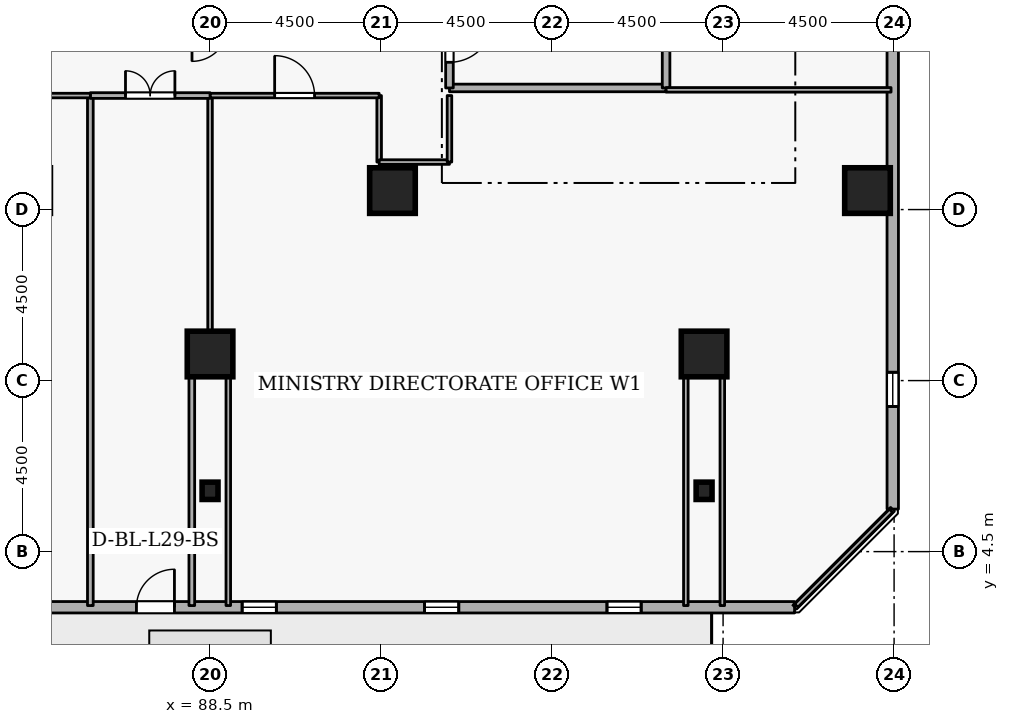
"""IFC4 building model, lengths in metres.
Left out: names, types, materials, properties, quantities, classifications, styles, units other than length and angle.
Written with IfcOpenShell. Run it as: python <this file> out.ifc"""

import sys

from ifc_helpers import new_model, si_unit, direction, frame, frame_2d, origin, origin_2d, place, context, subcontext, project, spatial, rectangle, i_section, extrude, element, fill, save


model = new_model("IFC4")
c1 = context("Model", 3, precision=1e-05, world=origin(), true_north=direction((0.0, 1.0)))
c2 = subcontext(c1, "Body", "Model", "MODEL_VIEW")
j1 = project(units=[si_unit("LENGTHUNIT", "METRE"), si_unit("PLANEANGLEUNIT", "RADIAN")], contexts=[c1])
p1 = place(None, origin())
s1 = spatial("IfcSite", under=j1, at=p1, CompositionType="ELEMENT")
p2 = place(p1, origin())
s2 = spatial("IfcBuilding", under=s1, at=p2, CompositionType="ELEMENT")
p3 = place(p2, frame((0.0, 0.0, 112.5)))
s3 = spatial("IfcBuildingStorey", under=s2, at=p3, CompositionType="ELEMENT", Elevation=112.5)
for number, where, z_axis, x_axis in (
    (1, (105.8, 14.0, 0.0), (0.0, 0.0, 1.0), (1.0, 0.0, 0.0)),
    (2, (101.5, 9.7, 0.0), (0.0, 0.0, 1.0), (1.0, 0.0, 0.0)),
    (3, (88.5, 9.7, 0.0), (0.0, 0.0, 1.0), (1.0, 0.0, 0.0)),
    (4, (93.3, 14.0, 0.0), (0.0, 0.0, 1.0), (1.0, 0.0, 0.0)),
):
    element("IfcColumn", number, at=place(p3, frame(where, z_axis=z_axis, x_axis=x_axis)), inside=s3, PredefinedType="COLUMN", context=c2, shape_type="SweptSolid", body=[
        extrude(rectangle(XDim=1.2, YDim=1.2, at=origin_2d()), origin(), (0.0, 0.0, 1.0), 3.6),
    ])
for number, where, z_axis, x_axis in (
    (5, (101.5, 6.1, 0.0), (0.0, 0.0, 1.0), (1.0, 0.0, 0.0)),
    (6, (88.5, 6.1, 0.0), (0.0, 0.0, 1.0), (1.0, 0.0, 0.0)),
):
    element("IfcColumn", number, at=place(p3, frame(where, z_axis=z_axis, x_axis=x_axis)), inside=s3, PredefinedType="COLUMN", context=c2, shape_type="SweptSolid", body=[
        extrude(i_section(OverallWidth=0.418, OverallDepth=0.456, WebThickness=0.042, FlangeThickness=0.067, FilletRadius=0.015, at=origin_2d()), origin(), (0.0, 0.0, 1.0), 3.6),
    ])
p4 = place(p3, frame((67.445, 3.036, 0.0), z_axis=(0.0, 0.0, 1.0), x_axis=(0.999999999641, -2.6801568e-05, 0.0)))
e7 = element("IfcWall", 7, at=p4, inside=s3, PredefinedType="STANDARD", context=c2, shape_type="SweptSolid", body=[
    extrude(rectangle(XDim=36.437, YDim=0.3, at=frame_2d((18.218, 0.0))), origin(), (0.0, 0.0, 1.0), 2.7),
])
p5 = place(p4, frame((19.118, 0.0, 0.0)))
e8 = element("IfcOpeningElement", 8, at=p5, cuts=e7, PredefinedType="OPENING", context=c2, shape_type="SweptSolid", body=[
    extrude(rectangle(XDim=1.0, YDim=2.08, at=frame_2d((0.5, 1.04))), frame((0.0, 0.16, 0.0), z_axis=(0.0, -1.0, 0.0), x_axis=(1.0, 0.0, 0.0)), (0.0, 0.0, 1.0), 0.32),
])
p6 = place(p4, frame((2.7, 0.0, 0.72)))
e9 = element("IfcOpeningElement", 9, at=p6, cuts=e7, PredefinedType="OPENING", context=c2, shape_type="SweptSolid", body=[
    extrude(rectangle(XDim=0.9, YDim=1.75, at=frame_2d((0.45, 0.875))), frame((0.0, 0.16, 0.0), z_axis=(0.0, -1.0, 0.0), x_axis=(1.0, 0.0, 0.0)), (0.0, 0.0, 1.0), 0.32),
])
p7 = place(p4, frame((12.3, 0.0, 0.72)))
e10 = element("IfcOpeningElement", 10, at=p7, cuts=e7, PredefinedType="OPENING", context=c2, shape_type="SweptSolid", body=[
    extrude(rectangle(XDim=0.9, YDim=1.75, at=frame_2d((0.45, 0.875))), frame((0.0, 0.16, 0.0), z_axis=(0.0, -1.0, 0.0), x_axis=(1.0, 0.0, 0.0)), (0.0, 0.0, 1.0), 0.32),
])
p8 = place(p4, frame((21.9, 0.0, 0.72)))
e11 = element("IfcOpeningElement", 11, at=p8, cuts=e7, PredefinedType="OPENING", context=c2, shape_type="SweptSolid", body=[
    extrude(rectangle(XDim=0.9, YDim=1.75, at=frame_2d((0.45, 0.875))), frame((0.0, 0.16, 0.0), z_axis=(0.0, -1.0, 0.0), x_axis=(1.0, 0.0, 0.0)), (0.0, 0.0, 1.0), 0.32),
])
p9 = place(p4, frame((26.7, 0.0, 0.72)))
e12 = element("IfcOpeningElement", 12, at=p9, cuts=e7, PredefinedType="OPENING", context=c2, shape_type="SweptSolid", body=[
    extrude(rectangle(XDim=0.9, YDim=1.75, at=frame_2d((0.45, 0.875))), frame((0.0, 0.16, 0.0), z_axis=(0.0, -1.0, 0.0), x_axis=(1.0, 0.0, 0.0)), (0.0, 0.0, 1.0), 0.32),
])
p10 = place(p4, frame((31.5, 0.0, 0.72)))
e13 = element("IfcOpeningElement", 13, at=p10, cuts=e7, PredefinedType="OPENING", context=c2, shape_type="SweptSolid", body=[
    extrude(rectangle(XDim=0.9, YDim=1.75, at=frame_2d((0.45, 0.875))), frame((0.0, 0.16, 0.0), z_axis=(0.0, -1.0, 0.0), x_axis=(1.0, 0.0, 0.0)), (0.0, 0.0, 1.0), 0.32),
])
p11 = place(p3, frame((106.465, 5.619, 0.0), z_axis=(0.0, 0.0, 1.0), x_axis=(-2.6801568e-05, 0.999999999641, 0.0)))
e14 = element("IfcWall", 14, at=p11, inside=s3, PredefinedType="STANDARD", context=c2, shape_type="SweptSolid", body=[
    extrude(rectangle(XDim=36.437, YDim=0.3, at=frame_2d((18.218, 0.0))), origin(), (0.0, 0.0, 1.0), 2.7),
])
p12 = place(p11, frame((2.7, 0.0, 0.72)))
e15 = element("IfcOpeningElement", 15, at=p12, cuts=e14, PredefinedType="OPENING", context=c2, shape_type="SweptSolid", body=[
    extrude(rectangle(XDim=0.9, YDim=1.75, at=frame_2d((0.45, 0.875))), frame((0.0, 0.16, 0.0), z_axis=(0.0, -1.0, 0.0), x_axis=(1.0, 0.0, 0.0)), (0.0, 0.0, 1.0), 0.32),
])
p13 = place(p11, frame((12.3, 0.0, 0.72)))
e16 = element("IfcOpeningElement", 16, at=p13, cuts=e14, PredefinedType="OPENING", context=c2, shape_type="SweptSolid", body=[
    extrude(rectangle(XDim=0.9, YDim=1.75, at=frame_2d((0.45, 0.875))), frame((0.0, 0.16, 0.0), z_axis=(0.0, -1.0, 0.0), x_axis=(1.0, 0.0, 0.0)), (0.0, 0.0, 1.0), 0.32),
])
p14 = place(p11, frame((17.1, 0.0, 0.72)))
e17 = element("IfcOpeningElement", 17, at=p14, cuts=e14, PredefinedType="OPENING", context=c2, shape_type="SweptSolid", body=[
    extrude(rectangle(XDim=0.9, YDim=1.75, at=frame_2d((0.45, 0.875))), frame((0.0, 0.16, 0.0), z_axis=(0.0, -1.0, 0.0), x_axis=(1.0, 0.0, 0.0)), (0.0, 0.0, 1.0), 0.32),
])
p15 = place(p11, frame((26.7, 0.0, 0.72)))
e18 = element("IfcOpeningElement", 18, at=p15, cuts=e14, PredefinedType="OPENING", context=c2, shape_type="SweptSolid", body=[
    extrude(rectangle(XDim=0.9, YDim=1.75, at=frame_2d((0.45, 0.875))), frame((0.0, 0.16, 0.0), z_axis=(0.0, -1.0, 0.0), x_axis=(1.0, 0.0, 0.0)), (0.0, 0.0, 1.0), 0.32),
])
p16 = place(p11, frame((31.5, 0.0, 0.72)))
e19 = element("IfcOpeningElement", 19, at=p16, cuts=e14, PredefinedType="OPENING", context=c2, shape_type="SweptSolid", body=[
    extrude(rectangle(XDim=0.9, YDim=1.75, at=frame_2d((0.45, 0.875))), frame((0.0, 0.16, 0.0), z_axis=(0.0, -1.0, 0.0), x_axis=(1.0, 0.0, 0.0)), (0.0, 0.0, 1.0), 0.32),
])
p17 = place(p3, frame((94.8, 16.7, 0.0), z_axis=(0.0, 0.0, 1.0), x_axis=(1.0, 0.0, 0.0)))
e20 = element("IfcWall", 20, at=p17, inside=s3, PredefinedType="STANDARD", context=c2, shape_type="SweptSolid", body=[
    extrude(rectangle(XDim=5.7, YDim=0.2, at=frame_2d((2.85, 0.0))), origin(), (0.0, 0.0, 1.0), 3.34),
])
p18 = place(p3, frame((100.5, 16.7, 0.0), z_axis=(0.0, 0.0, 1.0), x_axis=(0.0, 1.0, 0.0)))
e21 = element("IfcWall", 21, at=p18, inside=s3, PredefinedType="STANDARD", context=c2, shape_type="SweptSolid", body=[
    extrude(rectangle(XDim=2.5, YDim=0.2, at=frame_2d((1.25, 0.0))), origin(), (0.0, 0.0, 1.0), 3.34),
])
p19 = place(p3, frame((94.8, 19.2, 0.0), z_axis=(0.0, 0.0, 1.0), x_axis=(0.0, -1.0, 0.0)))
e22 = element("IfcWall", 22, at=p19, inside=s3, PredefinedType="STANDARD", context=c2, shape_type="SweptSolid", body=[
    extrude(rectangle(XDim=2.5, YDim=0.2, at=frame_2d((1.25, 0.0))), origin(), (0.0, 0.0, 1.0), 3.34),
])
p20 = place(p19, frame((0.675, 0.0, 0.0)))
e23 = element("IfcOpeningElement", 23, at=p20, cuts=e22, PredefinedType="OPENING", context=c2, shape_type="SweptSolid", body=[
    extrude(rectangle(XDim=1.15, YDim=2.1, at=frame_2d((0.575, 1.05))), frame((0.0, 0.11, 0.0), z_axis=(0.0, -1.0, 0.0), x_axis=(1.0, 0.0, 0.0)), (0.0, 0.0, 1.0), 0.22),
])
p21 = place(p3, frame((92.95, 16.5, 0.0), z_axis=(0.0, 0.0, 1.0), x_axis=(0.0, -1.0, 0.0)))
e24 = element("IfcWall", 24, at=p21, inside=s3, PredefinedType="PARTITIONING", context=c2, shape_type="SweptSolid", body=[
    extrude(rectangle(XDim=1.75, YDim=0.12, at=frame_2d((0.875, 0.0))), origin(), (0.0, 0.0, 1.0), 3.34),
])
p22 = place(p3, frame((92.95, 14.75, 0.0), z_axis=(0.0, 0.0, 1.0), x_axis=(1.0, 0.0, 0.0)))
e25 = element("IfcWall", 25, at=p22, inside=s3, PredefinedType="PARTITIONING", context=c2, shape_type="SweptSolid", body=[
    extrude(rectangle(XDim=1.85, YDim=0.12, at=frame_2d((0.925, 0.0))), origin(), (0.0, 0.0, 1.0), 3.34),
])
p23 = place(p3, frame((94.8, 14.75, 0.0), z_axis=(0.0, 0.0, 1.0), x_axis=(0.0, 1.0, 0.0)))
e26 = element("IfcWall", 26, at=p23, inside=s3, PredefinedType="PARTITIONING", context=c2, shape_type="SweptSolid", body=[
    extrude(rectangle(XDim=1.75, YDim=0.12, at=frame_2d((0.875, 0.0))), origin(), (0.0, 0.0, 1.0), 3.34),
])
p24 = place(p3, frame((100.5, 16.65, 0.0), z_axis=(0.0, 0.0, 1.0), x_axis=(1.0, 0.0, 0.0)))
e27 = element("IfcWall", 27, at=p24, inside=s3, PredefinedType="PARTITIONING", context=c2, shape_type="SweptSolid", body=[
    extrude(rectangle(XDim=5.92, YDim=0.12, at=frame_2d((2.96, 0.0))), origin(), (0.0, 0.0, 1.0), 3.34),
])
p25 = place(p3, frame((106.42, 5.575, 0.0), z_axis=(0.0, 0.0, 1.0), x_axis=(-0.707106781187, -0.707106781187, 0.0)))
e28 = element("IfcWall", 28, at=p25, inside=s3, PredefinedType="PARTITIONING", context=c2, shape_type="SweptSolid", body=[
    extrude(rectangle(XDim=3.528, YDim=0.12, at=frame_2d((1.764, 0.0))), origin(), (0.0, 0.0, 1.0), 3.34),
])
for number, where, z_axis, x_axis in (
    (29, (101.98, 3.08, 0.0), (0.0, 0.0, 1.0), (0.0, 1.0, 0.0)),
    (30, (101.02, 9.7, 0.0), (0.0, 0.0, 1.0), (0.0, -1.0, 0.0)),
    (31, (88.98, 3.08, 0.0), (0.0, 0.0, 1.0), (0.0, 1.0, 0.0)),
):
    element("IfcWall", number, at=place(p3, frame(where, z_axis=z_axis, x_axis=x_axis)), inside=s3, PredefinedType="PARTITIONING", context=c2, shape_type="SweptSolid", body=[
        extrude(rectangle(XDim=6.62, YDim=0.12, at=frame_2d((3.31, 0.0))), origin(), (0.0, 0.0, 1.0), 3.34),
    ])
p26 = place(p3, frame((88.5, 9.7, 0.0), z_axis=(0.0, 0.0, 1.0), x_axis=(0.0, 1.0, 0.0)))
e32 = element("IfcWall", 32, at=p26, inside=s3, PredefinedType="PARTITIONING", context=c2, shape_type="SweptSolid", body=[
    extrude(rectangle(XDim=6.8, YDim=0.12, at=frame_2d((3.4, 0.0))), origin(), (0.0, 0.0, 1.0), 2.882),
])
p27 = place(p3, frame((88.5, 16.5, 0.0), z_axis=(0.0, 0.0, 1.0), x_axis=(1.0, 0.0, 0.0)))
e33 = element("IfcWall", 33, at=p27, inside=s3, PredefinedType="PARTITIONING", context=c2, shape_type="SweptSolid", body=[
    extrude(rectangle(XDim=4.45, YDim=0.12, at=frame_2d((2.225, 0.0))), origin(), (0.0, 0.0, 1.0), 3.34),
])
p28 = place(p27, frame((1.7, 0.0, 0.0)))
e34 = element("IfcOpeningElement", 34, at=p28, cuts=e33, PredefinedType="OPENING", context=c2, shape_type="SweptSolid", body=[
    extrude(rectangle(XDim=1.05, YDim=2.1, at=frame_2d((0.525, 1.05))), frame((0.0, 0.07, 0.0), z_axis=(0.0, -1.0, 0.0), x_axis=(1.0, 0.0, 0.0)), (0.0, 0.0, 1.0), 0.14),
])
p29 = place(p3, frame((88.02, 9.7, 0.0), z_axis=(0.0, 0.0, 1.0), x_axis=(0.0, -1.0, 0.0)))
e35 = element("IfcWall", 35, at=p29, inside=s3, PredefinedType="PARTITIONING", context=c2, shape_type="SweptSolid", body=[
    extrude(rectangle(XDim=6.62, YDim=0.15, at=frame_2d((3.31, 0.0))), origin(), (0.0, 0.0, 1.0), 3.34),
])
p30 = place(p3, frame((85.35, 3.08, 0.0), z_axis=(0.0, 0.0, 1.0), x_axis=(0.0, 1.0, 0.0)))
e36 = element("IfcWall", 36, at=p30, inside=s3, PredefinedType="PARTITIONING", context=c2, shape_type="SweptSolid", body=[
    extrude(rectangle(XDim=13.42, YDim=0.15, at=frame_2d((6.71, 0.0))), origin(), (0.0, 0.0, 1.0), 3.34),
])
p31 = place(p3, frame((85.35, 16.5, 0.0), z_axis=(0.0, 0.0, 1.0), x_axis=(1.0, 0.0, 0.0)))
e37 = element("IfcWall", 37, at=p31, inside=s3, PredefinedType="PARTITIONING", context=c2, shape_type="SweptSolid", body=[
    extrude(rectangle(XDim=3.15, YDim=0.15, at=frame_2d((1.575, 0.0))), origin(), (0.0, 0.0, 1.0), 3.34),
])
p32 = place(p31, frame((0.925, 0.0, 0.0)))
e38 = element("IfcOpeningElement", 38, at=p32, cuts=e37, PredefinedType="OPENING", context=c2, shape_type="SweptSolid", body=[
    extrude(rectangle(XDim=1.3, YDim=2.12, at=frame_2d((0.65, 1.06))), frame((0.0, 0.085, 0.0), z_axis=(0.0, -1.0, 0.0), x_axis=(1.0, 0.0, 0.0)), (0.0, 0.0, 1.0), 0.17),
])
p33 = place(p3, frame((84.05, 16.5, 0.0), z_axis=(0.0, 0.0, 1.0), x_axis=(1.0, 0.0, 0.0)))
e39 = element("IfcWall", 39, at=p33, inside=s3, PredefinedType="PARTITIONING", context=c2, shape_type="SweptSolid", body=[
    extrude(rectangle(XDim=1.3, YDim=0.12, at=frame_2d((0.65, 0.0))), origin(), (0.0, 0.0, 1.0), 3.34),
])
p34 = place(p5, origin())
e40 = element("IfcDoor", 40, at=p34, inside=s3, OperationType="SINGLE_SWING_RIGHT", PredefinedType="DOOR", context=c2, shape_type="SweptSolid", body=[
    extrude(rectangle(XDim=1.0, YDim=2.08, at=frame_2d((0.5, 1.04))), frame((0.0, 0.025, 0.0), z_axis=(0.0, -1.0, 0.0), x_axis=(1.0, 0.0, 0.0)), (0.0, 0.0, 1.0), 0.05),
])
fill(e8, e40)
p35 = place(p8, origin())
e41 = element("IfcWindow", 41, at=p35, inside=s3, PartitioningType="SINGLE_PANEL", PredefinedType="WINDOW", context=c2, shape_type="SweptSolid", body=[
    extrude(rectangle(XDim=0.9, YDim=1.75, at=frame_2d((0.45, 0.875))), frame((0.0, 0.03, 0.0), z_axis=(0.0, -1.0, 0.0), x_axis=(1.0, 0.0, 0.0)), (0.0, 0.0, 1.0), 0.06),
])
fill(e11, e41)
p36 = place(p9, origin())
e42 = element("IfcWindow", 42, at=p36, inside=s3, PartitioningType="SINGLE_PANEL", PredefinedType="WINDOW", context=c2, shape_type="SweptSolid", body=[
    extrude(rectangle(XDim=0.9, YDim=1.75, at=frame_2d((0.45, 0.875))), frame((0.0, 0.03, 0.0), z_axis=(0.0, -1.0, 0.0), x_axis=(1.0, 0.0, 0.0)), (0.0, 0.0, 1.0), 0.06),
])
fill(e12, e42)
p37 = place(p10, origin())
e43 = element("IfcWindow", 43, at=p37, inside=s3, PartitioningType="SINGLE_PANEL", PredefinedType="WINDOW", context=c2, shape_type="SweptSolid", body=[
    extrude(rectangle(XDim=0.9, YDim=1.75, at=frame_2d((0.45, 0.875))), frame((0.0, 0.03, 0.0), z_axis=(0.0, -1.0, 0.0), x_axis=(1.0, 0.0, 0.0)), (0.0, 0.0, 1.0), 0.06),
])
fill(e13, e43)
p38 = place(p12, origin())
e44 = element("IfcWindow", 44, at=p38, inside=s3, PartitioningType="SINGLE_PANEL", PredefinedType="WINDOW", context=c2, shape_type="SweptSolid", body=[
    extrude(rectangle(XDim=0.9, YDim=1.75, at=frame_2d((0.45, 0.875))), frame((0.0, 0.03, 0.0), z_axis=(0.0, -1.0, 0.0), x_axis=(1.0, 0.0, 0.0)), (0.0, 0.0, 1.0), 0.06),
])
fill(e15, e44)
p39 = place(p20, origin())
e45 = element("IfcDoor", 45, at=p39, inside=s3, OperationType="SINGLE_SWING_LEFT", PredefinedType="DOOR", context=c2, shape_type="SweptSolid", body=[
    extrude(rectangle(XDim=1.15, YDim=2.1, at=frame_2d((0.575, 1.05))), frame((0.0, 0.025, 0.0), z_axis=(0.0, -1.0, 0.0), x_axis=(1.0, 0.0, 0.0)), (0.0, 0.0, 1.0), 0.05),
])
fill(e23, e45)
p40 = place(p28, origin())
e46 = element("IfcDoor", 46, at=p40, inside=s3, OperationType="SINGLE_SWING_LEFT", PredefinedType="DOOR", context=c2, shape_type="SweptSolid", body=[
    extrude(rectangle(XDim=1.05, YDim=2.1, at=frame_2d((0.525, 1.05))), frame((0.0, 0.025, 0.0), z_axis=(0.0, -1.0, 0.0), x_axis=(1.0, 0.0, 0.0)), (0.0, 0.0, 1.0), 0.05),
])
fill(e34, e46)
p41 = place(p32, origin())
e47 = element("IfcDoor", 47, at=p41, inside=s3, OperationType="DOUBLE_DOOR_SINGLE_SWING", PredefinedType="DOOR", context=c2, shape_type="SweptSolid", body=[
    extrude(rectangle(XDim=1.3, YDim=2.12, at=frame_2d((0.65, 1.06))), frame((0.0, 0.025, 0.0), z_axis=(0.0, -1.0, 0.0), x_axis=(1.0, 0.0, 0.0)), (0.0, 0.0, 1.0), 0.05),
])
fill(e38, e47)
save(model, sys.argv[1])
